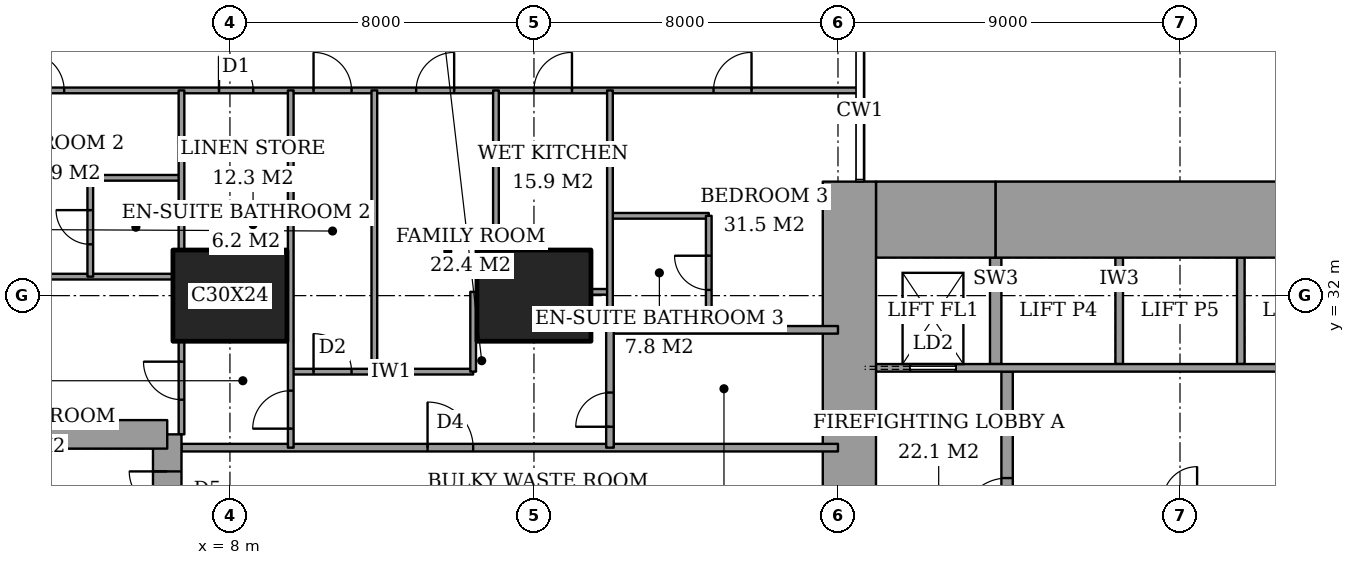
"""IFC4 building model, lengths in metres.
Left out: names, types, materials, properties, quantities, classifications, styles, units other than length and angle.
Written with IfcOpenShell. Run it as: python <this file> out.ifc"""

import sys

from ifc_helpers import new_model, si_unit, direction, frame, frame_2d, origin, origin_2d, place, context, subcontext, project, spatial, rectangle, extrude, element, fill, save


model = new_model("IFC4")
c1 = context("Model", 3, precision=1e-05, world=origin(), true_north=direction((0.0, 1.0)))
c2 = subcontext(c1, "Body", "Model", "MODEL_VIEW")
j1 = project(units=[si_unit("LENGTHUNIT", "METRE"), si_unit("PLANEANGLEUNIT", "RADIAN")], contexts=[c1])
p1 = place(None, origin())
s1 = spatial("IfcSite", under=j1, at=p1, CompositionType="ELEMENT")
p2 = place(p1, origin())
s2 = spatial("IfcBuilding", under=s1, at=p2, CompositionType="ELEMENT")
p3 = place(p2, frame((0.0, 0.0, 40.4)))
s3 = spatial("IfcBuildingStorey", under=s2, at=p3, CompositionType="ELEMENT", Elevation=40.4)
for number, where, z_axis, x_axis in (
    (1, (8.0, 32.0, 0.0), (0.0, 0.0, 1.0), (1.0, 0.0, 0.0)),
    (2, (16.0, 32.0, 0.0), (0.0, 0.0, 1.0), (1.0, 0.0, 0.0)),
):
    element("IfcColumn", number, at=place(p3, frame(where, z_axis=z_axis, x_axis=x_axis)), inside=s3, PredefinedType="COLUMN", context=c2, shape_type="SweptSolid", body=[
        extrude(rectangle(XDim=3.0, YDim=2.4, at=origin_2d()), origin(), (0.0, 0.0, 1.0), 3.6),
    ])
p4 = place(p3, frame((25.0, 34.0, 0.0), z_axis=(0.0, 0.0, 1.0), x_axis=(1.0, 0.0, 0.0)))
e3 = element("IfcWall", 3, at=p4, inside=s3, PredefinedType="SHEAR", context=c2, shape_type="SweptSolid", body=[
    extrude(rectangle(XDim=3.15, YDim=2.0, at=frame_2d((1.575, 0.0))), origin(), (0.0, 0.0, 1.0), 3.6),
])
p5 = place(p3, frame((28.15, 34.0, 0.0), z_axis=(0.0, 0.0, 1.0), x_axis=(1.0, 0.0, 0.0)))
e4 = element("IfcWall", 4, at=p5, inside=s3, PredefinedType="SHEAR", context=c2, shape_type="SweptSolid", body=[
    extrude(rectangle(XDim=9.7, YDim=2.0, at=frame_2d((4.85, 0.0))), origin(), (0.0, 0.0, 1.0), 3.6),
])
p6 = place(p3, frame((24.3, 23.15, 0.0), z_axis=(0.0, 0.0, 1.0), x_axis=(0.0, 1.0, 0.0)))
e5 = element("IfcWall", 5, at=p6, inside=s3, PredefinedType="SHEAR", context=c2, shape_type="SweptSolid", body=[
    extrude(rectangle(XDim=11.85, YDim=1.4, at=frame_2d((5.925, 0.0))), origin(), (0.0, 0.0, 1.0), 3.6),
])
p7 = place(p6, frame((0.75, 0.0, 0.0)))
e6 = element("IfcOpeningElement", 6, at=p7, cuts=e5, PredefinedType="OPENING", context=c2, shape_type="SweptSolid", body=[
    extrude(rectangle(XDim=1.8, YDim=2.4, at=frame_2d((0.9, 1.2))), frame((0.0, 0.71, 0.0), z_axis=(0.0, -1.0, 0.0), x_axis=(1.0, 0.0, 0.0)), (0.0, 0.0, 1.0), 1.42),
])
p8 = place(p3, frame((28.45, 23.3, 0.0), z_axis=(0.0, 0.0, 1.0), x_axis=(0.0, 1.0, 0.0)))
e7 = element("IfcWall", 7, at=p8, inside=s3, PredefinedType="PARTITIONING", context=c2, shape_type="SweptSolid", body=[
    extrude(rectangle(XDim=6.7, YDim=0.3, at=frame_2d((3.35, 0.0))), origin(), (0.0, 0.0, 1.0), 3.6),
])
p9 = place(p8, frame((2.7, 0.0, 0.0)))
e8 = element("IfcOpeningElement", 8, at=p9, cuts=e7, PredefinedType="OPENING", context=c2, shape_type="SweptSolid", body=[
    extrude(rectangle(XDim=1.2, YDim=2.1, at=frame_2d((0.6, 1.05))), frame((0.0, 0.16, 0.0), z_axis=(0.0, -1.0, 0.0), x_axis=(1.0, 0.0, 0.0)), (0.0, 0.0, 1.0), 0.32),
])
p10 = place(p3, frame((6.35, 19.65, 0.0), z_axis=(0.0, 0.0, 1.0), x_axis=(0.0, 1.0, 0.0)))
e9 = element("IfcWall", 9, at=p10, inside=s3, PredefinedType="SHEAR", context=c2, shape_type="SweptSolid", body=[
    extrude(rectangle(XDim=8.7, YDim=0.75, at=frame_2d((4.35, 0.0))), origin(), (0.0, 0.0, 1.0), 3.6),
])
p11 = place(p10, frame((6.725, 0.0, 0.0)))
e10 = element("IfcOpeningElement", 10, at=p11, cuts=e9, PredefinedType="OPENING", context=c2, shape_type="SweptSolid", body=[
    extrude(rectangle(XDim=1.0, YDim=2.1, at=frame_2d((0.5, 1.05))), frame((0.0, 0.385, 0.0), z_axis=(0.0, -1.0, 0.0), x_axis=(1.0, 0.0, 0.0)), (0.0, 0.0, 1.0), 0.77),
])
p12 = place(p3, frame((6.35, 28.35, 0.0), z_axis=(0.0, 0.0, 1.0), x_axis=(-1.0, 0.0, 0.0)))
e11 = element("IfcWall", 11, at=p12, inside=s3, PredefinedType="SHEAR", context=c2, shape_type="SweptSolid", body=[
    extrude(rectangle(XDim=4.45, YDim=0.75, at=frame_2d((2.225, 0.0))), origin(), (0.0, 0.0, 1.0), 3.6),
])
p13 = place(p3, frame((6.725, 28.0, 0.0), z_axis=(0.0, 0.0, 1.0), x_axis=(1.0, 0.0, 0.0)))
e12 = element("IfcWall", 12, at=p13, inside=s3, PredefinedType="PARTITIONING", context=c2, shape_type="SweptSolid", body=[
    extrude(rectangle(XDim=17.275, YDim=0.2, at=frame_2d((8.637, 0.0))), origin(), (0.0, 0.0, 1.0), 3.35),
])
p14 = place(p13, frame((6.475, 0.0, 0.0)))
e13 = element("IfcOpeningElement", 13, at=p14, cuts=e12, PredefinedType="OPENING", context=c2, shape_type="SweptSolid", body=[
    extrude(rectangle(XDim=1.2, YDim=2.4, at=frame_2d((0.6, 1.2))), frame((0.0, 0.11, 0.0), z_axis=(0.0, -1.0, 0.0), x_axis=(1.0, 0.0, 0.0)), (0.0, 0.0, 1.0), 0.22),
])
p15 = place(p3, frame((9.6, 30.0, 0.0), z_axis=(0.0, 0.0, 1.0), x_axis=(1.0, 0.0, 0.0)))
e14 = element("IfcWall", 14, at=p15, inside=s3, PredefinedType="PARTITIONING", context=c2, shape_type="SweptSolid", body=[
    extrude(rectangle(XDim=4.8, YDim=0.15, at=frame_2d((2.4, 0.0))), origin(), (0.0, 0.0, 1.0), 3.35),
])
p16 = place(p15, frame((0.6, 0.0, 0.0)))
e15 = element("IfcOpeningElement", 15, at=p16, cuts=e14, PredefinedType="OPENING", context=c2, shape_type="SweptSolid", body=[
    extrude(rectangle(XDim=1.0, YDim=2.1, at=frame_2d((0.5, 1.05))), frame((0.0, 0.085, 0.0), z_axis=(0.0, -1.0, 0.0), x_axis=(1.0, 0.0, 0.0)), (0.0, 0.0, 1.0), 0.17),
])
p17 = place(p3, frame((18.0, 31.1, 0.0), z_axis=(0.0, 0.0, 1.0), x_axis=(1.0, 0.0, 0.0)))
e16 = element("IfcWall", 16, at=p17, inside=s3, PredefinedType="PARTITIONING", context=c2, shape_type="SweptSolid", body=[
    extrude(rectangle(XDim=6.0, YDim=0.2, at=frame_2d((3.0, 0.0))), origin(), (0.0, 0.0, 1.0), 3.35),
])
p18 = place(p3, frame((17.5, 32.1, 0.0), z_axis=(0.0, 0.0, 1.0), x_axis=(1.0, 0.0, 0.0)))
e17 = element("IfcWall", 17, at=p18, inside=s3, PredefinedType="PARTITIONING", context=c2, shape_type="SweptSolid", body=[
    extrude(rectangle(XDim=0.5, YDim=0.15, at=frame_2d((0.25, 0.0))), origin(), (0.0, 0.0, 1.0), 2.634),
])
p19 = place(p3, frame((1.35, 32.5, 0.0), z_axis=(0.0, 0.0, 1.0), x_axis=(1.0, 0.0, 0.0)))
e18 = element("IfcWall", 18, at=p19, inside=s3, PredefinedType="PARTITIONING", context=c2, shape_type="SweptSolid", body=[
    extrude(rectangle(XDim=5.15, YDim=0.15, at=frame_2d((2.575, 0.0))), origin(), (0.0, 0.0, 1.0), 3.35),
])
p20 = place(p3, frame((18.0, 34.1, 0.0), z_axis=(0.0, 0.0, 1.0), x_axis=(1.0, 0.0, 0.0)))
e19 = element("IfcWall", 19, at=p20, inside=s3, PredefinedType="PARTITIONING", context=c2, shape_type="SweptSolid", body=[
    extrude(rectangle(XDim=2.6, YDim=0.15, at=frame_2d((1.3, 0.0))), origin(), (0.0, 0.0, 1.0), 3.35),
])
p21 = place(p3, frame((4.325, 35.1, 0.0), z_axis=(0.0, 0.0, 1.0), x_axis=(1.0, 0.0, 0.0)))
e20 = element("IfcWall", 20, at=p21, inside=s3, PredefinedType="PARTITIONING", context=c2, shape_type="SweptSolid", body=[
    extrude(rectangle(XDim=2.4, YDim=0.15, at=frame_2d((1.2, 0.0))), origin(), (0.0, 0.0, 1.0), 3.35),
])
p22 = place(p3, frame((-0.45, 37.4, 0.0), z_axis=(0.0, 0.0, 1.0), x_axis=(1.0, 0.0, 0.0)))
e21 = element("IfcWall", 21, at=p22, inside=s3, PredefinedType="PARTITIONING", context=c2, shape_type="SweptSolid", body=[
    extrude(rectangle(XDim=25.011, YDim=0.15, at=frame_2d((12.505, 0.0))), origin(), (0.0, 0.0, 1.0), 3.35),
])
p23 = place(p22, frame((10.65, 0.0, 0.0)))
e22 = element("IfcOpeningElement", 22, at=p23, cuts=e21, PredefinedType="OPENING", context=c2, shape_type="SweptSolid", body=[
    extrude(rectangle(XDim=1.0, YDim=2.1, at=frame_2d((0.5, 1.05))), frame((0.0, 0.085, 0.0), z_axis=(0.0, -1.0, 0.0), x_axis=(1.0, 0.0, 0.0)), (0.0, 0.0, 1.0), 0.17),
])
p24 = place(p22, frame((3.087, 0.0, 0.0)))
e23 = element("IfcOpeningElement", 23, at=p24, cuts=e21, PredefinedType="OPENING", context=c2, shape_type="SweptSolid", body=[
    extrude(rectangle(XDim=1.0, YDim=2.1, at=frame_2d((0.5, 1.05))), frame((0.0, 0.085, 0.0), z_axis=(0.0, -1.0, 0.0), x_axis=(1.0, 0.0, 0.0)), (0.0, 0.0, 1.0), 0.17),
])
p25 = place(p22, frame((8.163, 0.0, 0.0)))
e24 = element("IfcOpeningElement", 24, at=p25, cuts=e21, PredefinedType="OPENING", context=c2, shape_type="SweptSolid", body=[
    extrude(rectangle(XDim=0.9, YDim=2.1, at=frame_2d((0.45, 1.05))), frame((0.0, 0.085, 0.0), z_axis=(0.0, -1.0, 0.0), x_axis=(1.0, 0.0, 0.0)), (0.0, 0.0, 1.0), 0.17),
])
p26 = place(p22, frame((13.35, 0.0, 0.0)))
e25 = element("IfcOpeningElement", 25, at=p26, cuts=e21, PredefinedType="OPENING", context=c2, shape_type="SweptSolid", body=[
    extrude(rectangle(XDim=1.0, YDim=2.1, at=frame_2d((0.5, 1.05))), frame((0.0, 0.085, 0.0), z_axis=(0.0, -1.0, 0.0), x_axis=(1.0, 0.0, 0.0)), (0.0, 0.0, 1.0), 0.17),
])
p27 = place(p22, frame((16.45, 0.0, 0.0)))
e26 = element("IfcOpeningElement", 26, at=p27, cuts=e21, PredefinedType="OPENING", context=c2, shape_type="SweptSolid", body=[
    extrude(rectangle(XDim=1.0, YDim=2.1, at=frame_2d((0.5, 1.05))), frame((0.0, 0.085, 0.0), z_axis=(0.0, -1.0, 0.0), x_axis=(1.0, 0.0, 0.0)), (0.0, 0.0, 1.0), 0.17),
])
p28 = place(p22, frame((21.175, 0.0, 0.0)))
e27 = element("IfcOpeningElement", 27, at=p28, cuts=e21, PredefinedType="OPENING", context=c2, shape_type="SweptSolid", body=[
    extrude(rectangle(XDim=1.0, YDim=2.1, at=frame_2d((0.5, 1.05))), frame((0.0, 0.085, 0.0), z_axis=(0.0, -1.0, 0.0), x_axis=(1.0, 0.0, 0.0)), (0.0, 0.0, 1.0), 0.17),
])
p29 = place(p3, frame((4.325, 32.5, 0.0), z_axis=(0.0, 0.0, 1.0), x_axis=(0.0, 1.0, 0.0)))
e28 = element("IfcWall", 28, at=p29, inside=s3, PredefinedType="PARTITIONING", context=c2, shape_type="SweptSolid", body=[
    extrude(rectangle(XDim=2.6, YDim=0.15, at=frame_2d((1.3, 0.0))), origin(), (0.0, 0.0, 1.0), 3.35),
])
p30 = place(p29, frame((0.85, 0.0, 0.0)))
e29 = element("IfcOpeningElement", 29, at=p30, cuts=e28, PredefinedType="OPENING", context=c2, shape_type="SweptSolid", body=[
    extrude(rectangle(XDim=0.9, YDim=2.1, at=frame_2d((0.45, 1.05))), frame((0.0, 0.085, 0.0), z_axis=(0.0, -1.0, 0.0), x_axis=(1.0, 0.0, 0.0)), (0.0, 0.0, 1.0), 0.17),
])
p31 = place(p3, frame((6.725, 28.35, 0.0), z_axis=(0.0, 0.0, 1.0), x_axis=(0.0, 1.0, 0.0)))
e30 = element("IfcWall", 30, at=p31, inside=s3, PredefinedType="PARTITIONING", context=c2, shape_type="SweptSolid", body=[
    extrude(rectangle(XDim=2.45, YDim=0.15, at=frame_2d((1.225, 0.0))), origin(), (0.0, 0.0, 1.0), 3.35),
])
p32 = place(p31, frame((0.913, 0.0, 0.0)))
e31 = element("IfcOpeningElement", 31, at=p32, cuts=e30, PredefinedType="OPENING", context=c2, shape_type="SweptSolid", body=[
    extrude(rectangle(XDim=1.0, YDim=2.1, at=frame_2d((0.5, 1.05))), frame((0.0, 0.085, 0.0), z_axis=(0.0, -1.0, 0.0), x_axis=(1.0, 0.0, 0.0)), (0.0, 0.0, 1.0), 0.17),
])
p33 = place(p3, frame((6.725, 33.2, 0.0), z_axis=(0.0, 0.0, 1.0), x_axis=(0.0, 1.0, 0.0)))
e32 = element("IfcWall", 32, at=p33, inside=s3, PredefinedType="PARTITIONING", context=c2, shape_type="SweptSolid", body=[
    extrude(rectangle(XDim=4.2, YDim=0.15, at=frame_2d((2.1, 0.0))), origin(), (0.0, 0.0, 1.0), 3.35),
])
p34 = place(p3, frame((9.6, 28.0, 0.0), z_axis=(0.0, 0.0, 1.0), x_axis=(0.0, 1.0, 0.0)))
e33 = element("IfcWall", 33, at=p34, inside=s3, PredefinedType="PARTITIONING", context=c2, shape_type="SweptSolid", body=[
    extrude(rectangle(XDim=9.4, YDim=0.15, at=frame_2d((4.7, 0.0))), origin(), (0.0, 0.0, 1.0), 3.35),
])
p35 = place(p34, frame((0.5, 0.0, 0.0)))
e34 = element("IfcOpeningElement", 34, at=p35, cuts=e33, PredefinedType="OPENING", context=c2, shape_type="SweptSolid", body=[
    extrude(rectangle(XDim=1.0, YDim=2.1, at=frame_2d((0.5, 1.05))), frame((0.0, 0.085, 0.0), z_axis=(0.0, -1.0, 0.0), x_axis=(1.0, 0.0, 0.0)), (0.0, 0.0, 1.0), 0.17),
])
p36 = place(p3, frame((11.8, 30.0, 0.0), z_axis=(0.0, 0.0, 1.0), x_axis=(0.0, 1.0, 0.0)))
e35 = element("IfcWall", 35, at=p36, inside=s3, PredefinedType="PARTITIONING", context=c2, shape_type="SweptSolid", body=[
    extrude(rectangle(XDim=7.4, YDim=0.15, at=frame_2d((3.7, 0.0))), origin(), (0.0, 0.0, 1.0), 3.35),
])
p37 = place(p3, frame((14.4, 30.0, 0.0), z_axis=(0.0, 0.0, 1.0), x_axis=(0.0, 1.0, 0.0)))
e36 = element("IfcWall", 36, at=p37, inside=s3, PredefinedType="PARTITIONING", context=c2, shape_type="SweptSolid", body=[
    extrude(rectangle(XDim=2.1, YDim=0.15, at=frame_2d((1.05, 0.0))), origin(), (0.0, 0.0, 1.0), 3.35),
])
p38 = place(p3, frame((15.0, 33.2, 0.0), z_axis=(0.0, 0.0, 1.0), x_axis=(0.0, 1.0, 0.0)))
e37 = element("IfcWall", 37, at=p38, inside=s3, PredefinedType="PARTITIONING", context=c2, shape_type="SweptSolid", body=[
    extrude(rectangle(XDim=4.2, YDim=0.15, at=frame_2d((2.1, 0.0))), origin(), (0.0, 0.0, 1.0), 3.35),
])
p39 = place(p3, frame((18.0, 28.0, 0.0), z_axis=(0.0, 0.0, 1.0), x_axis=(0.0, 1.0, 0.0)))
e38 = element("IfcWall", 38, at=p39, inside=s3, PredefinedType="PARTITIONING", context=c2, shape_type="SweptSolid", body=[
    extrude(rectangle(XDim=3.1, YDim=0.2, at=frame_2d((1.55, 0.0))), origin(), (0.0, 0.0, 1.0), 3.35),
])
p40 = place(p39, frame((0.55, 0.0, 0.0)))
e39 = element("IfcOpeningElement", 39, at=p40, cuts=e38, PredefinedType="OPENING", context=c2, shape_type="SweptSolid", body=[
    extrude(rectangle(XDim=0.9, YDim=2.1, at=frame_2d((0.45, 1.05))), frame((0.0, 0.11, 0.0), z_axis=(0.0, -1.0, 0.0), x_axis=(1.0, 0.0, 0.0)), (0.0, 0.0, 1.0), 0.22),
])
p41 = place(p3, frame((18.0, 31.1, 0.0), z_axis=(0.0, 0.0, 1.0), x_axis=(0.0, 1.0, 0.0)))
e40 = element("IfcWall", 40, at=p41, inside=s3, PredefinedType="PARTITIONING", context=c2, shape_type="SweptSolid", body=[
    extrude(rectangle(XDim=6.3, YDim=0.15, at=frame_2d((3.15, 0.0))), origin(), (0.0, 0.0, 1.0), 3.35),
])
p42 = place(p3, frame((20.6, 31.1, 0.0), z_axis=(0.0, 0.0, 1.0), x_axis=(0.0, 1.0, 0.0)))
e41 = element("IfcWall", 41, at=p42, inside=s3, PredefinedType="PARTITIONING", context=c2, shape_type="SweptSolid", body=[
    extrude(rectangle(XDim=3.0, YDim=0.15, at=frame_2d((1.5, 0.0))), origin(), (0.0, 0.0, 1.0), 3.35),
])
p43 = place(p42, frame((1.05, 0.0, 0.0)))
e42 = element("IfcOpeningElement", 42, at=p43, cuts=e41, PredefinedType="OPENING", context=c2, shape_type="SweptSolid", body=[
    extrude(rectangle(XDim=0.9, YDim=2.1, at=frame_2d((0.45, 1.05))), frame((0.0, 0.085, 0.0), z_axis=(0.0, -1.0, 0.0), x_axis=(1.0, 0.0, 0.0)), (0.0, 0.0, 1.0), 0.17),
])
p44 = place(p3, frame((25.0, 30.1, 0.0), z_axis=(0.0, 0.0, 1.0), x_axis=(1.0, 0.0, 0.0)))
e43 = element("IfcWall", 43, at=p44, inside=s3, PredefinedType="PARTITIONING", context=c2, shape_type="SweptSolid", body=[
    extrude(rectangle(XDim=12.7, YDim=0.2, at=frame_2d((6.35, 0.0))), origin(), (0.0, 0.0, 1.0), 3.6),
])
p45 = place(p44, frame((0.9, 0.0, 0.0)))
e44 = element("IfcOpeningElement", 44, at=p45, cuts=e43, PredefinedType="OPENING", context=c2, shape_type="SweptSolid", body=[
    extrude(rectangle(XDim=1.2, YDim=2.1, at=frame_2d((0.6, 1.05))), frame((0.0, 0.11, 0.0), z_axis=(0.0, -1.0, 0.0), x_axis=(1.0, 0.0, 0.0)), (0.0, 0.0, 1.0), 0.22),
])
for number, where, z_axis, x_axis in (
    (45, (31.4, 30.2, 0.0), (0.0, 0.0, 1.0), (0.0, 1.0, 0.0)),
    (46, (34.6, 30.2, 0.0), (0.0, 0.0, 1.0), (0.0, 1.0, 0.0)),
):
    element("IfcWall", number, at=place(p3, frame(where, z_axis=z_axis, x_axis=x_axis)), inside=s3, PredefinedType="PARTITIONING", context=c2, shape_type="SweptSolid", body=[
        extrude(rectangle(XDim=2.8, YDim=0.2, at=frame_2d((1.4, 0.0))), origin(), (0.0, 0.0, 1.0), 3.6),
    ])
p46 = place(p3, frame((28.15, 30.2, 0.0), z_axis=(0.0, 0.0, 1.0), x_axis=(0.0, 1.0, 0.0)))
e47 = element("IfcWall", 47, at=p46, inside=s3, PredefinedType="SHEAR", context=c2, shape_type="SweptSolid", body=[
    extrude(rectangle(XDim=2.8, YDim=0.3, at=frame_2d((1.4, 0.0))), origin(), (0.0, 0.0, 1.0), 3.6),
])
p47 = place(p23, origin())
e48 = element("IfcDoor", 48, at=p47, inside=s3, OperationType="SINGLE_SWING_RIGHT", PredefinedType="DOOR", context=c2, shape_type="SweptSolid", body=[
    extrude(rectangle(XDim=1.0, YDim=2.1, at=frame_2d((0.5, 1.05))), frame((0.0, 0.025, 0.0), z_axis=(0.0, -1.0, 0.0), x_axis=(1.0, 0.0, 0.0)), (0.0, 0.0, 1.0), 0.05),
])
fill(e22, e48)
p48 = place(p30, origin())
e49 = element("IfcDoor", 49, at=p48, inside=s3, OperationType="SINGLE_SWING_LEFT", PredefinedType="DOOR", context=c2, shape_type="SweptSolid", body=[
    extrude(rectangle(XDim=0.9, YDim=2.1, at=frame_2d((0.45, 1.05))), frame((0.0, 0.025, 0.0), z_axis=(0.0, -1.0, 0.0), x_axis=(1.0, 0.0, 0.0)), (0.0, 0.0, 1.0), 0.05),
])
fill(e29, e49)
p49 = place(p24, origin())
e50 = element("IfcDoor", 50, at=p49, inside=s3, OperationType="SINGLE_SWING_RIGHT", PredefinedType="DOOR", context=c2, shape_type="SweptSolid", body=[
    extrude(rectangle(XDim=1.0, YDim=2.1, at=frame_2d((0.5, 1.05))), frame((0.0, 0.025, 0.0), z_axis=(0.0, -1.0, 0.0), x_axis=(1.0, 0.0, 0.0)), (0.0, 0.0, 1.0), 0.05),
])
fill(e23, e50)
p50 = place(p32, origin())
e51 = element("IfcDoor", 51, at=p50, inside=s3, OperationType="SINGLE_SWING_LEFT", PredefinedType="DOOR", context=c2, shape_type="SweptSolid", body=[
    extrude(rectangle(XDim=1.0, YDim=2.1, at=frame_2d((0.5, 1.05))), frame((0.0, 0.025, 0.0), z_axis=(0.0, -1.0, 0.0), x_axis=(1.0, 0.0, 0.0)), (0.0, 0.0, 1.0), 0.05),
])
fill(e31, e51)
p51 = place(p25, origin())
e52 = element("IfcDoor", 52, at=p51, inside=s3, OperationType="SINGLE_SWING_RIGHT", PredefinedType="DOOR", context=c2, shape_type="SweptSolid", body=[
    extrude(rectangle(XDim=0.9, YDim=2.1, at=frame_2d((0.45, 1.05))), frame((0.0, 0.025, 0.0), z_axis=(0.0, -1.0, 0.0), x_axis=(1.0, 0.0, 0.0)), (0.0, 0.0, 1.0), 0.05),
])
fill(e24, e52)
p52 = place(p35, origin())
e53 = element("IfcDoor", 53, at=p52, inside=s3, OperationType="SINGLE_SWING_RIGHT", PredefinedType="DOOR", context=c2, shape_type="SweptSolid", body=[
    extrude(rectangle(XDim=1.0, YDim=2.1, at=frame_2d((0.5, 1.05))), frame((0.0, 0.025, 0.0), z_axis=(0.0, -1.0, 0.0), x_axis=(1.0, 0.0, 0.0)), (0.0, 0.0, 1.0), 0.05),
])
fill(e34, e53)
p53 = place(p14, origin())
e54 = element("IfcDoor", 54, at=p53, inside=s3, OperationType="SINGLE_SWING_RIGHT", PredefinedType="DOOR", context=c2, shape_type="SweptSolid", body=[
    extrude(rectangle(XDim=1.2, YDim=2.4, at=frame_2d((0.6, 1.2))), frame((0.0, 0.025, 0.0), z_axis=(0.0, -1.0, 0.0), x_axis=(1.0, 0.0, 0.0)), (0.0, 0.0, 1.0), 0.05),
])
fill(e13, e54)
p54 = place(p16, origin())
e55 = element("IfcDoor", 55, at=p54, inside=s3, OperationType="SINGLE_SWING_RIGHT", PredefinedType="DOOR", context=c2, shape_type="SweptSolid", body=[
    extrude(rectangle(XDim=1.0, YDim=2.1, at=frame_2d((0.5, 1.05))), frame((0.0, 0.025, 0.0), z_axis=(0.0, -1.0, 0.0), x_axis=(1.0, 0.0, 0.0)), (0.0, 0.0, 1.0), 0.05),
])
fill(e15, e55)
p55 = place(p26, origin())
e56 = element("IfcDoor", 56, at=p55, inside=s3, OperationType="SINGLE_SWING_LEFT", PredefinedType="DOOR", context=c2, shape_type="SweptSolid", body=[
    extrude(rectangle(XDim=1.0, YDim=2.1, at=frame_2d((0.5, 1.05))), frame((0.0, 0.025, 0.0), z_axis=(0.0, -1.0, 0.0), x_axis=(1.0, 0.0, 0.0)), (0.0, 0.0, 1.0), 0.05),
])
fill(e25, e56)
p56 = place(p27, origin())
e57 = element("IfcDoor", 57, at=p56, inside=s3, OperationType="SINGLE_SWING_LEFT", PredefinedType="DOOR", context=c2, shape_type="SweptSolid", body=[
    extrude(rectangle(XDim=1.0, YDim=2.1, at=frame_2d((0.5, 1.05))), frame((0.0, 0.025, 0.0), z_axis=(0.0, -1.0, 0.0), x_axis=(1.0, 0.0, 0.0)), (0.0, 0.0, 1.0), 0.05),
])
fill(e26, e57)
p57 = place(p43, origin())
e58 = element("IfcDoor", 58, at=p57, inside=s3, OperationType="SINGLE_SWING_LEFT", PredefinedType="DOOR", context=c2, shape_type="SweptSolid", body=[
    extrude(rectangle(XDim=0.9, YDim=2.1, at=frame_2d((0.45, 1.05))), frame((0.0, 0.025, 0.0), z_axis=(0.0, -1.0, 0.0), x_axis=(1.0, 0.0, 0.0)), (0.0, 0.0, 1.0), 0.05),
])
fill(e42, e58)
p58 = place(p28, origin())
e59 = element("IfcDoor", 59, at=p58, inside=s3, OperationType="SINGLE_SWING_LEFT", PredefinedType="DOOR", context=c2, shape_type="SweptSolid", body=[
    extrude(rectangle(XDim=1.0, YDim=2.1, at=frame_2d((0.5, 1.05))), frame((0.0, 0.025, 0.0), z_axis=(0.0, -1.0, 0.0), x_axis=(1.0, 0.0, 0.0)), (0.0, 0.0, 1.0), 0.05),
])
fill(e27, e59)
p59 = place(p40, origin())
e60 = element("IfcDoor", 60, at=p59, inside=s3, OperationType="SINGLE_SWING_RIGHT", PredefinedType="DOOR", context=c2, shape_type="SweptSolid", body=[
    extrude(rectangle(XDim=0.9, YDim=2.1, at=frame_2d((0.45, 1.05))), frame((0.0, 0.025, 0.0), z_axis=(0.0, -1.0, 0.0), x_axis=(1.0, 0.0, 0.0)), (0.0, 0.0, 1.0), 0.05),
])
fill(e39, e60)
p60 = place(p9, origin())
e61 = element("IfcDoor", 61, at=p60, inside=s3, OperationType="SINGLE_SWING_RIGHT", PredefinedType="DOOR", context=c2, shape_type="SweptSolid", body=[
    extrude(rectangle(XDim=1.2, YDim=2.1, at=frame_2d((0.6, 1.05))), frame((0.0, 0.025, 0.0), z_axis=(0.0, -1.0, 0.0), x_axis=(1.0, 0.0, 0.0)), (0.0, 0.0, 1.0), 0.05),
])
fill(e8, e61)
p61 = place(p45, origin())
e62 = element("IfcDoor", 62, at=p61, inside=s3, OperationType="SLIDING_TO_LEFT", PredefinedType="DOOR", context=c2, shape_type="SweptSolid", body=[
    extrude(rectangle(XDim=1.2, YDim=2.1, at=frame_2d((0.6, 1.05))), frame((0.0, 0.025, 0.0), z_axis=(0.0, -1.0, 0.0), x_axis=(1.0, 0.0, 0.0)), (0.0, 0.0, 1.0), 0.05),
])
fill(e44, e62)
p62 = place(p11, origin())
e63 = element("IfcDoor", 63, at=p62, inside=s3, OperationType="SINGLE_SWING_LEFT", PredefinedType="DOOR", context=c2, shape_type="SweptSolid", body=[
    extrude(rectangle(XDim=1.0, YDim=2.1, at=frame_2d((0.5, 1.05))), frame((0.0, 0.025, 0.0), z_axis=(0.0, -1.0, 0.0), x_axis=(1.0, 0.0, 0.0)), (0.0, 0.0, 1.0), 0.05),
])
fill(e10, e63)
save(model, sys.argv[1])
